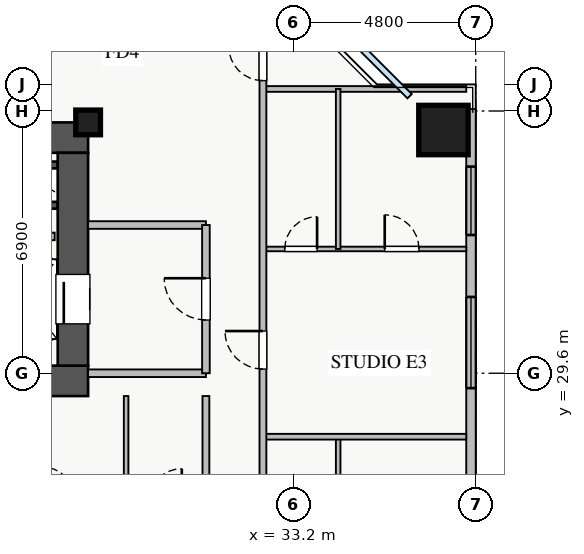
"""IFC4 building model, lengths in metres.
Left out: names, types, materials, properties, quantities, classifications, styles, units other than length and angle.
Written with IfcOpenShell. Run it as: python <this file> out.ifc"""

import sys

from ifc_helpers import new_model, si_unit, direction, frame, frame_2d, origin, origin_2d, place, context, subcontext, project, spatial, rectangle, extrude, source, transform, mapped, element, fill, save


model = new_model("IFC4")
c1 = context("Model", 3, precision=1e-05, world=origin(), true_north=direction((0.0, 1.0)))
c2 = subcontext(c1, "Body", "Model", "MODEL_VIEW")
j1 = project(units=[si_unit("LENGTHUNIT", "METRE"), si_unit("PLANEANGLEUNIT", "RADIAN")], contexts=[c1])
p1 = place(None, origin())
s1 = spatial("IfcSite", under=j1, at=p1, CompositionType="ELEMENT")
p2 = place(p1, origin())
s2 = spatial("IfcBuilding", under=s1, at=p2, CompositionType="ELEMENT")
p3 = place(p2, frame((0.0, 0.0, 50.25)))
s3 = spatial("IfcBuildingStorey", under=s2, at=p3, CompositionType="ELEMENT", Elevation=50.25)
for number, where, z_axis, x_axis in (
    (1, (25.8, 35.08, 0.0), (0.0, 0.0, 1.0), (1.0, 0.0, 0.0)),
    (2, (25.8, 34.02, 0.0), (0.0, 0.0, 1.0), (1.0, 0.0, 0.0)),
):
    element("IfcWall", number, at=place(p3, frame(where, z_axis=z_axis, x_axis=x_axis)), inside=s3, PredefinedType="SHEAR", context=c2, shape_type="SweptSolid", body=[
        extrude(rectangle(XDim=1.2, YDim=0.18, at=frame_2d((0.6, 0.0))), origin(), (0.0, 0.0, 1.0), 3.07),
    ])
p4 = place(p3, frame((10.2, 29.4, 0.0), z_axis=(0.0, 0.0, 1.0), x_axis=(1.0, 0.0, 0.0)))
e3 = element("IfcWall", 3, at=p4, inside=s3, PredefinedType="SHEAR", context=c2, shape_type="SweptSolid", body=[
    extrude(rectangle(XDim=17.6, YDim=0.8, at=frame_2d((8.8, 0.0))), origin(), (0.0, 0.0, 1.0), 3.25),
])
p5 = place(p3, frame((10.2, 35.8, 0.0), z_axis=(0.0, 0.0, 1.0), x_axis=(1.0, 0.0, 0.0)))
e4 = element("IfcWall", 4, at=p5, inside=s3, PredefinedType="SHEAR", context=c2, shape_type="SweptSolid", body=[
    extrude(rectangle(XDim=17.6, YDim=0.8, at=frame_2d((8.8, 0.0))), origin(), (0.0, 0.0, 1.0), 3.25),
])
p6 = place(p5, frame((1.15, 0.0, 0.0)))
e5 = element("IfcOpeningElement", 5, at=p6, cuts=e4, PredefinedType="OPENING", context=c2, shape_type="SweptSolid", body=[
    extrude(rectangle(XDim=1.1, YDim=2.05, at=frame_2d((0.55, 1.025))), frame((0.0, 0.41, 0.0), z_axis=(0.0, -1.0, 0.0), x_axis=(1.0, 0.0, 0.0)), (0.0, 0.0, 1.0), 0.82),
])
p7 = place(p5, frame((8.3, 0.0, 0.0)))
e6 = element("IfcOpeningElement", 6, at=p7, cuts=e4, PredefinedType="OPENING", context=c2, shape_type="SweptSolid", body=[
    extrude(rectangle(XDim=1.1, YDim=2.05, at=frame_2d((0.55, 1.025))), frame((0.0, 0.41, 0.0), z_axis=(0.0, -1.0, 0.0), x_axis=(1.0, 0.0, 0.0)), (0.0, 0.0, 1.0), 0.82),
])
p8 = place(p5, frame((10.05, 0.0, 0.0)))
e7 = element("IfcOpeningElement", 7, at=p8, cuts=e4, PredefinedType="OPENING", context=c2, shape_type="SweptSolid", body=[
    extrude(rectangle(XDim=1.1, YDim=2.05, at=frame_2d((0.55, 1.025))), frame((0.0, 0.41, 0.0), z_axis=(0.0, -1.0, 0.0), x_axis=(1.0, 0.0, 0.0)), (0.0, 0.0, 1.0), 0.82),
])
p9 = place(p5, frame((14.74, 0.0, 0.0)))
e8 = element("IfcOpeningElement", 8, at=p9, cuts=e4, PredefinedType="OPENING", context=c2, shape_type="SweptSolid", body=[
    extrude(rectangle(XDim=1.0, YDim=2.05, at=frame_2d((0.5, 1.025))), frame((0.0, 0.41, 0.0), z_axis=(0.0, -1.0, 0.0), x_axis=(1.0, 0.0, 0.0)), (0.0, 0.0, 1.0), 0.82),
])
p10 = place(p5, frame((11.835, 0.0, 0.0)))
e9 = element("IfcOpeningElement", 9, at=p10, cuts=e4, PredefinedType="OPENING", context=c2, shape_type="SweptSolid", body=[
    extrude(rectangle(XDim=1.0, YDim=2.05, at=frame_2d((0.5, 1.025))), frame((0.0, 0.41, 0.0), z_axis=(0.0, -1.0, 0.0), x_axis=(1.0, 0.0, 0.0)), (0.0, 0.0, 1.0), 0.82),
])
p11 = place(p5, frame((13.37, 0.0, 0.0)))
e10 = element("IfcOpeningElement", 10, at=p11, cuts=e4, PredefinedType="OPENING", context=c2, shape_type="SweptSolid", body=[
    extrude(rectangle(XDim=1.0, YDim=2.05, at=frame_2d((0.5, 1.025))), frame((0.0, 0.41, 0.0), z_axis=(0.0, -1.0, 0.0), x_axis=(1.0, 0.0, 0.0)), (0.0, 0.0, 1.0), 0.82),
])
p12 = place(p3, frame((27.4, 29.8, 0.0), z_axis=(0.0, 0.0, 1.0), x_axis=(0.0, 1.0, 0.0)))
e11 = element("IfcWall", 11, at=p12, inside=s3, PredefinedType="SHEAR", context=c2, shape_type="SweptSolid", body=[
    extrude(rectangle(XDim=5.6, YDim=0.8, at=frame_2d((2.8, 0.0))), origin(), (0.0, 0.0, 1.0), 3.25),
])
p13 = place(p12, frame((1.1, 0.0, 0.0)))
e12 = element("IfcOpeningElement", 12, at=p13, cuts=e11, PredefinedType="OPENING", context=c2, shape_type="SweptSolid", body=[
    extrude(rectangle(XDim=1.3, YDim=2.05, at=frame_2d((0.65, 1.025))), frame((0.0, 0.41, 0.0), z_axis=(0.0, -1.0, 0.0), x_axis=(1.0, 0.0, 0.0)), (0.0, 0.0, 1.0), 0.82),
])
m1 = source(origin(), c2, "Body", "SweptSolid", [
    extrude(rectangle(XDim=0.65, YDim=0.65, at=origin_2d()), origin(), (0.0, 0.0, 1.0), 3.25),
])
p14 = place(p3, frame((27.8, 36.2, 0.0), z_axis=(0.0, 0.0, 1.0), x_axis=(1.0, 0.0, 0.0)))
e13 = element("IfcColumn", 13, at=p14, inside=s3, PredefinedType="PILASTER", context=c2, shape_type="MappedRepresentation", body=[
    mapped(m1, transform((0.0, 0.0, 0.0), x_axis=(1.0, 0.0, 0.0), y_axis=(0.0, 1.0, 0.0), z_axis=(0.0, 0.0, 1.0), scale=1.0)),
])
m2 = source(origin(), c2, "Body", "SweptSolid", [
    extrude(rectangle(XDim=1.3, YDim=1.3, at=origin_2d()), origin(), (0.0, 0.0, 1.0), 3.25),
])
p15 = place(p3, frame((37.15, 36.0, 0.0), z_axis=(0.0, 0.0, 1.0), x_axis=(1.0, 0.0, 0.0)))
e14 = element("IfcColumn", 14, at=p15, inside=s3, PredefinedType="COLUMN", context=c2, shape_type="MappedRepresentation", body=[
    mapped(m2, transform((0.0, 0.0, 0.0), x_axis=(1.0, 0.0, 0.0), y_axis=(0.0, 1.0, 0.0), z_axis=(0.0, 0.0, 1.0), scale=1.0)),
])
p16 = place(p3, frame((37.875, 9.45, 0.0), z_axis=(0.0, 0.0, 1.0), x_axis=(0.0, 1.0, 0.0)))
e15 = element("IfcWall", 15, at=p16, inside=s3, PredefinedType="STANDARD", context=c2, shape_type="SweptSolid", body=[
    extrude(rectangle(XDim=27.1, YDim=0.25, at=frame_2d((13.55, 0.0))), origin(), (0.0, 0.0, 1.0), 2.61),
])
p17 = place(p16, frame((1.673, 0.0, 0.9)))
e16 = element("IfcOpeningElement", 16, at=p17, cuts=e15, PredefinedType="OPENING", context=c2, shape_type="SweptSolid", body=[
    extrude(rectangle(XDim=2.4, YDim=1.5, at=frame_2d((1.2, 0.75))), frame((0.0, 0.135, 0.0), z_axis=(0.0, -1.0, 0.0), x_axis=(1.0, 0.0, 0.0)), (0.0, 0.0, 1.0), 0.27),
])
p18 = place(p16, frame((23.788, 0.0, 0.9)))
e17 = element("IfcOpeningElement", 17, at=p18, cuts=e15, PredefinedType="OPENING", context=c2, shape_type="SweptSolid", body=[
    extrude(rectangle(XDim=1.8, YDim=1.5, at=frame_2d((0.9, 0.75))), frame((0.0, 0.135, 0.0), z_axis=(0.0, -1.0, 0.0), x_axis=(1.0, 0.0, 0.0)), (0.0, 0.0, 1.0), 0.27),
])
p19 = place(p16, frame((19.758, 0.0, 0.9)))
e18 = element("IfcOpeningElement", 18, at=p19, cuts=e15, PredefinedType="OPENING", context=c2, shape_type="SweptSolid", body=[
    extrude(rectangle(XDim=2.4, YDim=1.5, at=frame_2d((1.2, 0.75))), frame((0.0, 0.135, 0.0), z_axis=(0.0, -1.0, 0.0), x_axis=(1.0, 0.0, 0.0)), (0.0, 0.0, 1.0), 0.27),
])
p20 = place(p16, frame((11.365, 0.0, 0.9)))
e19 = element("IfcOpeningElement", 19, at=p20, cuts=e15, PredefinedType="OPENING", context=c2, shape_type="SweptSolid", body=[
    extrude(rectangle(XDim=0.9, YDim=1.2, at=frame_2d((0.45, 0.6))), frame((0.0, 0.135, 0.0), z_axis=(0.0, -1.0, 0.0), x_axis=(1.0, 0.0, 0.0)), (0.0, 0.0, 1.0), 0.27),
])
for number, where, z_axis, x_axis in (
    (20, (27.8, 29.6, 0.0), (0.0, 0.0, 1.0), (1.0, 0.0, 0.0)),
    (21, (27.8, 33.5, 0.0), (0.0, 0.0, 1.0), (1.0, 0.0, 0.0)),
):
    element("IfcWall", number, at=place(p3, frame(where, z_axis=z_axis, x_axis=x_axis)), inside=s3, PredefinedType="PARTITIONING", context=c2, shape_type="SweptSolid", body=[
        extrude(rectangle(XDim=3.1, YDim=0.2, at=frame_2d((1.55, 0.0))), origin(), (0.0, 0.0, 1.0), 3.07),
    ])
p21 = place(p3, frame((30.9, 29.6, 0.0), z_axis=(0.0, 0.0, 1.0), x_axis=(0.0, 1.0, 0.0)))
e22 = element("IfcWall", 22, at=p21, inside=s3, PredefinedType="PARTITIONING", context=c2, shape_type="SweptSolid", body=[
    extrude(rectangle(XDim=3.9, YDim=0.2, at=frame_2d((1.95, 0.0))), origin(), (0.0, 0.0, 1.0), 3.07),
])
p22 = place(p21, frame((1.4, 0.0, 0.0)))
e23 = element("IfcOpeningElement", 23, at=p22, cuts=e22, PredefinedType="OPENING", context=c2, shape_type="SweptSolid", body=[
    extrude(rectangle(XDim=1.1, YDim=2.05, at=frame_2d((0.55, 1.025))), frame((0.0, 0.11, 0.0), z_axis=(0.0, -1.0, 0.0), x_axis=(1.0, 0.0, 0.0)), (0.0, 0.0, 1.0), 0.22),
])
p23 = place(p3, frame((21.75, 33.2, 0.0), z_axis=(0.0, 0.0, 1.0), x_axis=(1.0, 0.0, 0.0)))
e24 = element("IfcWall", 24, at=p23, inside=s3, PredefinedType="PARTITIONING", context=c2, shape_type="SweptSolid", body=[
    extrude(rectangle(XDim=5.17, YDim=0.2, at=frame_2d((2.585, 0.0))), origin(), (0.0, 0.0, 1.0), 3.07),
])
p24 = place(p3, frame((32.4, 37.08, 0.0), z_axis=(0.0, 0.0, 1.0), x_axis=(1.0, 0.0, 0.0)))
e25 = element("IfcWall", 25, at=p24, inside=s3, PredefinedType="PARTITIONING", context=c2, shape_type="SweptSolid", body=[
    extrude(rectangle(XDim=5.35, YDim=0.15, at=frame_2d((2.675, 0.0))), origin(), (0.0, 0.0, 1.0), 3.07),
])
p25 = place(p3, frame((34.38, 23.1, 0.0), z_axis=(0.0, 0.0, 1.0), x_axis=(0.0, 1.0, 0.0)))
e26 = element("IfcWall", 26, at=p25, inside=s3, PredefinedType="PLUMBINGWALL", context=c2, shape_type="SweptSolid", body=[
    extrude(rectangle(XDim=4.83, YDim=0.12, at=frame_2d((2.415, 0.0))), origin(), (0.0, 0.0, 1.0), 3.07),
])
p26 = place(p3, frame((32.4, 32.87, 0.0), z_axis=(0.0, 0.0, 1.0), x_axis=(1.0, 0.0, 0.0)))
e27 = element("IfcWall", 27, at=p26, inside=s3, PredefinedType="PLUMBINGWALL", context=c2, shape_type="SweptSolid", body=[
    extrude(rectangle(XDim=5.35, YDim=0.12, at=frame_2d((2.675, 0.0))), origin(), (0.0, 0.0, 1.0), 3.07),
])
p27 = place(p26, frame((0.575, 0.0, 0.0)))
e28 = element("IfcOpeningElement", 28, at=p27, cuts=e27, PredefinedType="OPENING", context=c2, shape_type="SweptSolid", body=[
    extrude(rectangle(XDim=0.85, YDim=2.05, at=frame_2d((0.425, 1.025))), frame((0.0, 0.07, 0.0), z_axis=(0.0, -1.0, 0.0), x_axis=(1.0, 0.0, 0.0)), (0.0, 0.0, 1.0), 0.14),
])
p28 = place(p26, frame((3.205, 0.0, 0.0)))
e29 = element("IfcOpeningElement", 29, at=p28, cuts=e27, PredefinedType="OPENING", context=c2, shape_type="SweptSolid", body=[
    extrude(rectangle(XDim=0.9, YDim=2.05, at=frame_2d((0.45, 1.025))), frame((0.0, 0.07, 0.0), z_axis=(0.0, -1.0, 0.0), x_axis=(1.0, 0.0, 0.0)), (0.0, 0.0, 1.0), 0.14),
])
p29 = place(p3, frame((34.38, 32.87, 0.0), z_axis=(0.0, 0.0, 1.0), x_axis=(0.0, 1.0, 0.0)))
e30 = element("IfcWall", 30, at=p29, inside=s3, PredefinedType="PLUMBINGWALL", context=c2, shape_type="SweptSolid", body=[
    extrude(rectangle(XDim=4.21, YDim=0.12, at=frame_2d((2.105, 0.0))), origin(), (0.0, 0.0, 1.0), 3.07),
])
p30 = place(p3, frame((32.4, 27.93, 0.0), z_axis=(0.0, 0.0, 1.0), x_axis=(1.0, 0.0, 0.0)))
e31 = element("IfcWall", 31, at=p30, inside=s3, PredefinedType="PARTITIONING", context=c2, shape_type="SweptSolid", body=[
    extrude(rectangle(XDim=5.35, YDim=0.15, at=frame_2d((2.675, 0.0))), origin(), (0.0, 0.0, 1.0), 2.821),
])
p31 = place(p3, frame((32.4, 7.21, 0.0), z_axis=(0.0, 0.0, 1.0), x_axis=(0.0, 1.0, 0.0)))
e32 = element("IfcWall", 32, at=p31, inside=s3, PredefinedType="PARTITIONING", context=c2, shape_type="SweptSolid", body=[
    extrude(rectangle(XDim=31.23, YDim=0.18, at=frame_2d((15.615, 0.0))), origin(), (0.0, 0.0, 1.0), 2.765),
])
p32 = place(p31, frame((30.09, 0.0, 0.0)))
e33 = element("IfcOpeningElement", 33, at=p32, cuts=e32, PredefinedType="OPENING", context=c2, shape_type="SweptSolid", body=[
    extrude(rectangle(XDim=0.9, YDim=2.05, at=frame_2d((0.45, 1.025))), frame((0.0, 0.1, 0.0), z_axis=(0.0, -1.0, 0.0), x_axis=(1.0, 0.0, 0.0)), (0.0, 0.0, 1.0), 0.2),
])
p33 = place(p31, frame((0.415, 0.0, 0.0)))
e34 = element("IfcOpeningElement", 34, at=p33, cuts=e32, PredefinedType="OPENING", context=c2, shape_type="SweptSolid", body=[
    extrude(rectangle(XDim=0.9, YDim=2.05, at=frame_2d((0.45, 1.025))), frame((0.0, 0.1, 0.0), z_axis=(0.0, -1.0, 0.0), x_axis=(1.0, 0.0, 0.0)), (0.0, 0.0, 1.0), 0.2),
])
p34 = place(p31, frame((3.585, 0.0, 0.0)))
e35 = element("IfcOpeningElement", 35, at=p34, cuts=e32, PredefinedType="OPENING", context=c2, shape_type="SweptSolid", body=[
    extrude(rectangle(XDim=1.0, YDim=2.05, at=frame_2d((0.5, 1.025))), frame((0.0, 0.1, 0.0), z_axis=(0.0, -1.0, 0.0), x_axis=(1.0, 0.0, 0.0)), (0.0, 0.0, 1.0), 0.2),
])
p35 = place(p31, frame((12.86, 0.0, 0.0)))
e36 = element("IfcOpeningElement", 36, at=p35, cuts=e32, PredefinedType="OPENING", context=c2, shape_type="SweptSolid", body=[
    extrude(rectangle(XDim=1.0, YDim=2.05, at=frame_2d((0.5, 1.025))), frame((0.0, 0.1, 0.0), z_axis=(0.0, -1.0, 0.0), x_axis=(1.0, 0.0, 0.0)), (0.0, 0.0, 1.0), 0.2),
])
p36 = place(p31, frame((22.5, 0.0, 0.0)))
e37 = element("IfcOpeningElement", 37, at=p36, cuts=e32, PredefinedType="OPENING", context=c2, shape_type="SweptSolid", body=[
    extrude(rectangle(XDim=1.0, YDim=2.05, at=frame_2d((0.5, 1.025))), frame((0.0, 0.1, 0.0), z_axis=(0.0, -1.0, 0.0), x_axis=(1.0, 0.0, 0.0)), (0.0, 0.0, 1.0), 0.2),
])
p37 = place(p3, frame((28.8, 26.24, 0.0), z_axis=(0.0, 0.0, 1.0), x_axis=(0.0, 1.0, 0.0)))
e38 = element("IfcWall", 38, at=p37, inside=s3, PredefinedType="PLUMBINGWALL", context=c2, shape_type="SweptSolid", body=[
    extrude(rectangle(XDim=2.76, YDim=0.12, at=frame_2d((1.38, 0.0))), origin(), (0.0, 0.0, 1.0), 3.07),
])
p38 = place(p3, frame((30.9, 17.0, 0.0), z_axis=(0.0, 0.0, 1.0), x_axis=(0.0, 1.0, 0.0)))
e39 = element("IfcWall", 39, at=p38, inside=s3, PredefinedType="PARTITIONING", context=c2, shape_type="SweptSolid", body=[
    extrude(rectangle(XDim=12.0, YDim=0.18, at=frame_2d((6.0, 0.0))), origin(), (0.0, 0.0, 1.0), 3.07),
])
p39 = place(p38, frame((0.93, 0.0, 0.0)))
e40 = element("IfcOpeningElement", 40, at=p39, cuts=e39, PredefinedType="OPENING", context=c2, shape_type="SweptSolid", body=[
    extrude(rectangle(XDim=1.0, YDim=2.05, at=frame_2d((0.5, 1.025))), frame((0.0, 0.1, 0.0), z_axis=(0.0, -1.0, 0.0), x_axis=(1.0, 0.0, 0.0)), (0.0, 0.0, 1.0), 0.2),
])
p40 = place(p38, frame((6.93, 0.0, 0.0)))
e41 = element("IfcOpeningElement", 41, at=p40, cuts=e39, PredefinedType="OPENING", context=c2, shape_type="SweptSolid", body=[
    extrude(rectangle(XDim=1.0, YDim=2.05, at=frame_2d((0.5, 1.025))), frame((0.0, 0.1, 0.0), z_axis=(0.0, -1.0, 0.0), x_axis=(1.0, 0.0, 0.0)), (0.0, 0.0, 1.0), 0.2),
])
m3 = source(origin(), c2, "Body", "SweptSolid", [
    extrude(rectangle(XDim=1.8, YDim=1.5, at=frame_2d((0.9, 0.75))), frame((0.0, 0.03, 0.0), z_axis=(0.0, -1.0, 0.0), x_axis=(1.0, 0.0, 0.0)), (0.0, 0.0, 1.0), 0.06),
])
p41 = place(p18, origin())
e42 = element("IfcWindow", 42, at=p41, inside=s3, PartitioningType="TRIPLE_PANEL_VERTICAL", PredefinedType="WINDOW", context=c2, shape_type="MappedRepresentation", body=[
    mapped(m3, transform((0.0, 0.0, 0.0), x_axis=(1.0, 0.0, 0.0), y_axis=(0.0, 1.0, 0.0), z_axis=(0.0, 0.0, 1.0), scale=1.0)),
])
fill(e17, e42)
m4 = source(origin(), c2, "Body", "SweptSolid", [
    extrude(rectangle(XDim=1.3, YDim=2.05, at=frame_2d((0.65, 1.025))), frame((0.0, 0.025, 0.0), z_axis=(0.0, -1.0, 0.0), x_axis=(1.0, 0.0, 0.0)), (0.0, 0.0, 1.0), 0.05),
])
p42 = place(p13, origin())
e43 = element("IfcDoor", 43, at=p42, inside=s3, OperationType="SLIDING_TO_LEFT", PredefinedType="DOOR", context=c2, shape_type="MappedRepresentation", body=[
    mapped(m4, transform((0.0, 0.0, 0.0), x_axis=(1.0, 0.0, 0.0), y_axis=(0.0, 1.0, 0.0), z_axis=(0.0, 0.0, 1.0), scale=1.0)),
])
fill(e12, e43)
m5 = source(origin(), c2, "Body", "SweptSolid", [
    extrude(rectangle(XDim=1.1, YDim=2.05, at=frame_2d((0.55, 1.025))), frame((0.0, 0.025, 0.0), z_axis=(0.0, -1.0, 0.0), x_axis=(1.0, 0.0, 0.0)), (0.0, 0.0, 1.0), 0.05),
])
p43 = place(p22, origin())
e44 = element("IfcDoor", 44, at=p43, inside=s3, OperationType="SINGLE_SWING_RIGHT", PredefinedType="DOOR", context=c2, shape_type="MappedRepresentation", body=[
    mapped(m5, transform((0.0, 0.0, 0.0), x_axis=(1.0, 0.0, 0.0), y_axis=(0.0, 1.0, 0.0), z_axis=(0.0, 0.0, 1.0), scale=1.0)),
])
fill(e23, e44)
m6 = source(origin(), c2, "Body", "SweptSolid", [
    extrude(rectangle(XDim=0.85, YDim=2.05, at=frame_2d((0.425, 1.025))), frame((0.0, 0.025, 0.0), z_axis=(0.0, -1.0, 0.0), x_axis=(1.0, 0.0, 0.0)), (0.0, 0.0, 1.0), 0.05),
])
p44 = place(p27, origin())
e45 = element("IfcDoor", 45, at=p44, inside=s3, OperationType="SINGLE_SWING_RIGHT", PredefinedType="DOOR", context=c2, shape_type="MappedRepresentation", body=[
    mapped(m6, transform((0.0, 0.0, 0.0), x_axis=(1.0, 0.0, 0.0), y_axis=(0.0, 1.0, 0.0), z_axis=(0.0, 0.0, 1.0), scale=1.0)),
])
fill(e28, e45)
m7 = source(origin(), c2, "Body", "SweptSolid", [
    extrude(rectangle(XDim=0.9, YDim=2.05, at=frame_2d((0.45, 1.025))), frame((0.0, 0.025, 0.0), z_axis=(0.0, -1.0, 0.0), x_axis=(1.0, 0.0, 0.0)), (0.0, 0.0, 1.0), 0.05),
])
p45 = place(p28, origin())
e46 = element("IfcDoor", 46, at=p45, inside=s3, OperationType="SINGLE_SWING_LEFT", PredefinedType="DOOR", context=c2, shape_type="MappedRepresentation", body=[
    mapped(m7, transform((0.0, 0.0, 0.0), x_axis=(1.0, 0.0, 0.0), y_axis=(0.0, 1.0, 0.0), z_axis=(0.0, 0.0, 1.0), scale=1.0)),
])
fill(e29, e46)
p46 = place(p32, origin())
e47 = element("IfcDoor", 47, at=p46, inside=s3, OperationType="SINGLE_SWING_RIGHT", PredefinedType="DOOR", context=c2, shape_type="MappedRepresentation", body=[
    mapped(m7, transform((0.0, 0.0, 0.0), x_axis=(1.0, 0.0, 0.0), y_axis=(0.0, 1.0, 0.0), z_axis=(0.0, 0.0, 1.0), scale=1.0)),
])
fill(e33, e47)
m8 = source(origin(), c2, "Body", "SweptSolid", [
    extrude(rectangle(XDim=1.0, YDim=2.05, at=frame_2d((0.5, 1.025))), frame((0.0, 0.025, 0.0), z_axis=(0.0, -1.0, 0.0), x_axis=(1.0, 0.0, 0.0)), (0.0, 0.0, 1.0), 0.05),
])
p47 = place(p36, origin())
e48 = element("IfcDoor", 48, at=p47, inside=s3, OperationType="SINGLE_SWING_RIGHT", PredefinedType="DOOR", context=c2, shape_type="MappedRepresentation", body=[
    mapped(m8, transform((0.0, 0.0, 0.0), x_axis=(1.0, 0.0, 0.0), y_axis=(0.0, 1.0, 0.0), z_axis=(0.0, 0.0, 1.0), scale=1.0)),
])
fill(e37, e48)
m9 = source(origin(), c2, "Body", "SweptSolid", [
    extrude(rectangle(XDim=2.4, YDim=1.5, at=frame_2d((1.2, 0.75))), frame((0.0, 0.03, 0.0), z_axis=(0.0, -1.0, 0.0), x_axis=(1.0, 0.0, 0.0)), (0.0, 0.0, 1.0), 0.06),
])
p48 = place(p19, origin())
e49 = element("IfcWindow", 49, at=p48, inside=s3, PartitioningType="TRIPLE_PANEL_VERTICAL", PredefinedType="WINDOW", context=c2, shape_type="MappedRepresentation", body=[
    mapped(m9, transform((0.0, 0.0, 0.0), x_axis=(1.0, 0.0, 0.0), y_axis=(0.0, 1.0, 0.0), z_axis=(0.0, 0.0, 1.0), scale=1.0)),
])
fill(e18, e49)
save(model, sys.argv[1])
